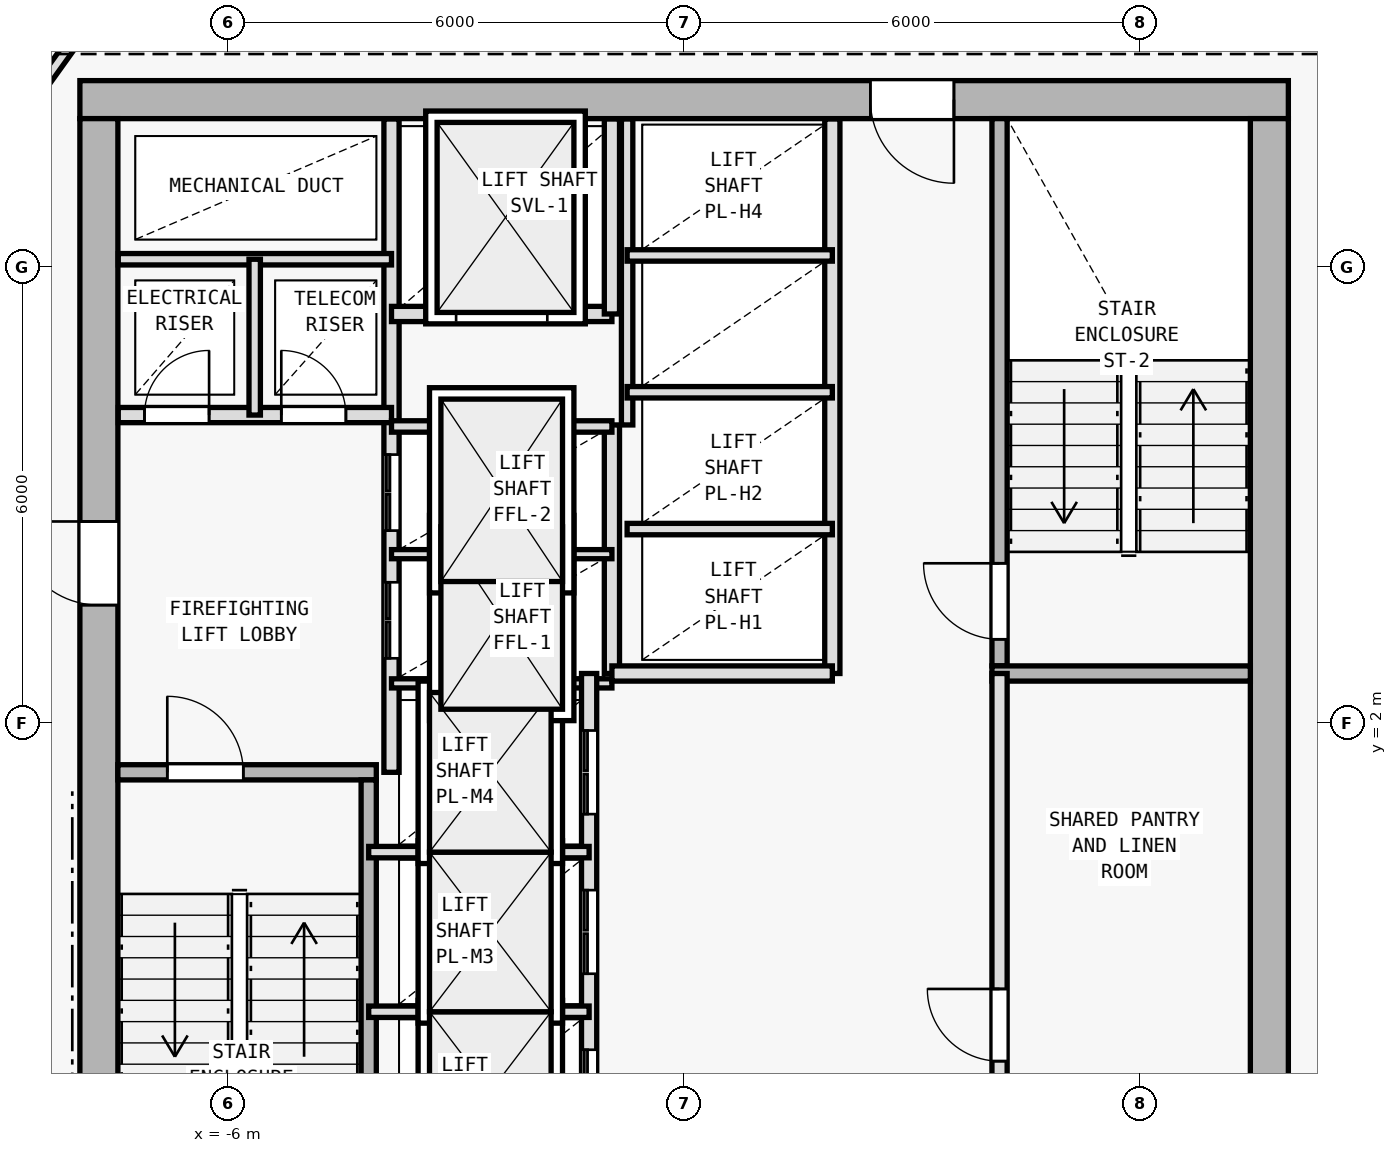
"""IFC4 building model, lengths in metres.
Left out: names, types, materials, properties, quantities, classifications, styles, units other than length and angle.
Written with IfcOpenShell. Run it as: python <this file> out.ifc"""

import sys

from ifc_helpers import new_model, si_unit, direction, frame, frame_2d, origin, origin_2d, place, context, subcontext, project, spatial, rectangle, i_section, extrude, element, fill, save


model = new_model("IFC4")
c1 = context("Model", 3, precision=1e-05, world=origin(), true_north=direction((0.0, 1.0)))
c2 = subcontext(c1, "Body", "Model", "MODEL_VIEW")
j1 = project(units=[si_unit("LENGTHUNIT", "METRE"), si_unit("PLANEANGLEUNIT", "RADIAN")], contexts=[c1])
p1 = place(None, origin())
s1 = spatial("IfcSite", under=j1, at=p1, CompositionType="ELEMENT")
p2 = place(p1, origin())
s2 = spatial("IfcBuilding", under=s1, at=p2, CompositionType="ELEMENT")
p3 = place(p2, frame((0.0, 0.0, 181.8)))
s3 = spatial("IfcBuildingStorey", under=s2, at=p3, CompositionType="ELEMENT", Elevation=181.8)
for number, where, z_axis, x_axis in (
    (1, (7.7, 10.2, 0.0), (0.0, 0.0, 1.0), (1.0, 0.0, 0.0)),
    (2, (-7.7, 10.2, 0.0), (0.0, 0.0, 1.0), (1.0, 0.0, 0.0)),
    (3, (7.7, 0.4, 0.0), (0.0, 0.0, 1.0), (1.0, 0.0, 0.0)),
    (4, (-7.7, 2.0, 0.0), (0.0, 0.0, 1.0), (1.0, 0.0, 0.0)),
):
    element("IfcColumn", number, at=place(p3, frame(where, z_axis=z_axis, x_axis=x_axis)), inside=s3, PredefinedType="COLUMN", context=c2, shape_type="SweptSolid", body=[
        extrude(i_section(OverallWidth=0.404, OverallDepth=0.407, WebThickness=0.017, FlangeThickness=0.028, FilletRadius=0.015, at=origin_2d()), origin(), (0.0, 0.0, 1.0), 3.6),
    ])
p4 = place(p3, frame((7.95, 10.2, 0.0), z_axis=(0.0, 0.0, 1.0), x_axis=(-1.0, 0.0, 0.0)))
e5 = element("IfcWall", 5, at=p4, inside=s3, PredefinedType="SHEAR", context=c2, shape_type="SweptSolid", body=[
    extrude(rectangle(XDim=15.9, YDim=0.5, at=frame_2d((7.95, 0.0))), origin(), (0.0, 0.0, 1.0), 3.28),
])
p5 = place(p4, frame((4.4, 0.0, 0.0)))
e6 = element("IfcOpeningElement", 6, at=p5, cuts=e5, PredefinedType="OPENING", context=c2, shape_type="SweptSolid", body=[
    extrude(rectangle(XDim=1.1, YDim=2.15, at=frame_2d((0.55, 1.075))), frame((0.0, 0.26, 0.0), z_axis=(0.0, -1.0, 0.0), x_axis=(1.0, 0.0, 0.0)), (0.0, 0.0, 1.0), 0.52),
])
p6 = place(p3, frame((-7.7, -9.15, 0.0), z_axis=(0.0, 0.0, 1.0), x_axis=(0.0, 1.0, 0.0)))
e7 = element("IfcWall", 7, at=p6, inside=s3, PredefinedType="SHEAR", context=c2, shape_type="SweptSolid", body=[
    extrude(rectangle(XDim=19.1, YDim=0.5, at=frame_2d((9.55, 0.0))), origin(), (0.0, 0.0, 1.0), 3.28),
])
p7 = place(p6, frame((12.7, 0.0, 0.0)))
e8 = element("IfcOpeningElement", 8, at=p7, cuts=e7, PredefinedType="OPENING", context=c2, shape_type="SweptSolid", body=[
    extrude(rectangle(XDim=1.1, YDim=2.15, at=frame_2d((0.55, 1.075))), frame((0.0, 0.26, 0.0), z_axis=(0.0, -1.0, 0.0), x_axis=(1.0, 0.0, 0.0)), (0.0, 0.0, 1.0), 0.52),
])
p8 = place(p3, frame((7.7, 9.95, 0.0), z_axis=(0.0, 0.0, 1.0), x_axis=(0.0, -1.0, 0.0)))
e9 = element("IfcWall", 9, at=p8, inside=s3, PredefinedType="SHEAR", context=c2, shape_type="SweptSolid", body=[
    extrude(rectangle(XDim=19.1, YDim=0.5, at=frame_2d((9.55, 0.0))), origin(), (0.0, 0.0, 1.0), 3.28),
])
p9 = place(p3, frame((-7.45, 1.35, 0.0), z_axis=(0.0, 0.0, 1.0), x_axis=(1.0, 0.0, 0.0)))
e10 = element("IfcWall", 10, at=p9, inside=s3, PredefinedType="SOLIDWALL", context=c2, shape_type="SweptSolid", body=[
    extrude(rectangle(XDim=3.4, YDim=0.2, at=frame_2d((1.7, 0.0))), origin(), (0.0, 0.0, 1.0), 3.28),
])
p10 = place(p9, frame((0.65, 0.0, 0.0)))
e11 = element("IfcOpeningElement", 11, at=p10, cuts=e10, PredefinedType="OPENING", context=c2, shape_type="SweptSolid", body=[
    extrude(rectangle(XDim=1.0, YDim=2.15, at=frame_2d((0.5, 1.075))), frame((0.0, 0.11, 0.0), z_axis=(0.0, -1.0, 0.0), x_axis=(1.0, 0.0, 0.0)), (0.0, 0.0, 1.0), 0.22),
])
p11 = place(p3, frame((-4.15, -5.95, 0.0), z_axis=(0.0, 0.0, 1.0), x_axis=(0.0, 1.0, 0.0)))
e12 = element("IfcWall", 12, at=p11, inside=s3, PredefinedType="SOLIDWALL", context=c2, shape_type="SweptSolid", body=[
    extrude(rectangle(XDim=7.2, YDim=0.2, at=frame_2d((3.6, 0.0))), origin(), (0.0, 0.0, 1.0), 3.28),
])
p12 = place(p3, frame((-3.85, 1.35, 0.0), z_axis=(0.0, 0.0, 1.0), x_axis=(0.0, 1.0, 0.0)))
e13 = element("IfcWall", 13, at=p12, inside=s3, PredefinedType="SOLIDWALL", context=c2, shape_type="SweptSolid", body=[
    extrude(rectangle(XDim=8.595, YDim=0.2, at=frame_2d((4.297, 0.0))), origin(), (0.0, 0.0, 1.0), 3.28),
])
p13 = place(p12, frame((1.5, 0.0, 0.0)))
e14 = element("IfcOpeningElement", 14, at=p13, cuts=e13, PredefinedType="OPENING", context=c2, shape_type="SweptSolid", body=[
    extrude(rectangle(XDim=1.0, YDim=2.15, at=frame_2d((0.5, 1.075))), frame((0.0, 0.11, 0.0), z_axis=(0.0, -1.0, 0.0), x_axis=(1.0, 0.0, 0.0)), (0.0, 0.0, 1.0), 0.22),
])
p14 = place(p12, frame((3.18, 0.0, 0.0)))
e15 = element("IfcOpeningElement", 15, at=p14, cuts=e13, PredefinedType="OPENING", context=c2, shape_type="SweptSolid", body=[
    extrude(rectangle(XDim=1.0, YDim=2.15, at=frame_2d((0.5, 1.075))), frame((0.0, 0.11, 0.0), z_axis=(0.0, -1.0, 0.0), x_axis=(1.0, 0.0, 0.0)), (0.0, 0.0, 1.0), 0.22),
])
p15 = place(p3, frame((-7.445, 6.05, 0.0), z_axis=(0.0, 0.0, 1.0), x_axis=(1.0, 0.0, 0.0)))
e16 = element("IfcWall", 16, at=p15, inside=s3, PredefinedType="SOLIDWALL", context=c2, shape_type="SweptSolid", body=[
    extrude(rectangle(XDim=3.595, YDim=0.2, at=frame_2d((1.797, 0.0))), origin(), (0.0, 0.0, 1.0), 3.28),
])
p16 = place(p15, frame((0.345, 0.0, 0.0)))
e17 = element("IfcOpeningElement", 17, at=p16, cuts=e16, PredefinedType="OPENING", context=c2, shape_type="SweptSolid", body=[
    extrude(rectangle(XDim=0.85, YDim=2.1, at=frame_2d((0.425, 1.05))), frame((0.0, 0.11, 0.0), z_axis=(0.0, -1.0, 0.0), x_axis=(1.0, 0.0, 0.0)), (0.0, 0.0, 1.0), 0.22),
])
p17 = place(p15, frame((2.145, 0.0, 0.0)))
e18 = element("IfcOpeningElement", 18, at=p17, cuts=e16, PredefinedType="OPENING", context=c2, shape_type="SweptSolid", body=[
    extrude(rectangle(XDim=0.85, YDim=2.1, at=frame_2d((0.425, 1.05))), frame((0.0, 0.11, 0.0), z_axis=(0.0, -1.0, 0.0), x_axis=(1.0, 0.0, 0.0)), (0.0, 0.0, 1.0), 0.22),
])
p18 = place(p3, frame((-7.445, 8.1, 0.0), z_axis=(0.0, 0.0, 1.0), x_axis=(1.0, 0.0, 0.0)))
e19 = element("IfcWall", 19, at=p18, inside=s3, PredefinedType="PARTITIONING", context=c2, shape_type="SweptSolid", body=[
    extrude(rectangle(XDim=3.595, YDim=0.15, at=frame_2d((1.797, 0.0))), origin(), (0.0, 0.0, 1.0), 3.28),
])
p19 = place(p3, frame((-5.65, 6.05, 0.0), z_axis=(0.0, 0.0, 1.0), x_axis=(0.0, 1.0, 0.0)))
e20 = element("IfcWall", 20, at=p19, inside=s3, PredefinedType="PARTITIONING", context=c2, shape_type="SweptSolid", body=[
    extrude(rectangle(XDim=2.05, YDim=0.15, at=frame_2d((1.025, 0.0))), origin(), (0.0, 0.0, 1.0), 3.28),
])
p20 = place(p3, frame((4.15, 2.75, 0.0), z_axis=(0.0, 0.0, 1.0), x_axis=(0.0, 1.0, 0.0)))
e21 = element("IfcWall", 21, at=p20, inside=s3, PredefinedType="SOLIDWALL", context=c2, shape_type="SweptSolid", body=[
    extrude(rectangle(XDim=7.2, YDim=0.2, at=frame_2d((3.6, 0.0))), origin(), (0.0, 0.0, 1.0), 3.28),
])
p21 = place(p20, frame((0.35, 0.0, 0.0)))
e22 = element("IfcOpeningElement", 22, at=p21, cuts=e21, PredefinedType="OPENING", context=c2, shape_type="SweptSolid", body=[
    extrude(rectangle(XDim=1.0, YDim=2.15, at=frame_2d((0.5, 1.075))), frame((0.0, 0.11, 0.0), z_axis=(0.0, -1.0, 0.0), x_axis=(1.0, 0.0, 0.0)), (0.0, 0.0, 1.0), 0.22),
])
p22 = place(p3, frame((4.05, 2.65, 0.0), z_axis=(0.0, 0.0, 1.0), x_axis=(1.0, 0.0, 0.0)))
e23 = element("IfcWall", 23, at=p22, inside=s3, PredefinedType="SOLIDWALL", context=c2, shape_type="SweptSolid", body=[
    extrude(rectangle(XDim=3.4, YDim=0.2, at=frame_2d((1.7, 0.0))), origin(), (0.0, 0.0, 1.0), 3.28),
])
p23 = place(p3, frame((-0.95, 2.65, 0.0), z_axis=(0.0, 0.0, 1.0), x_axis=(0.0, 1.0, 0.0)))
e24 = element("IfcWall", 24, at=p23, inside=s3, PredefinedType="SOLIDWALL", context=c2, shape_type="SweptSolid", body=[
    extrude(rectangle(XDim=3.27, YDim=0.2, at=frame_2d((1.635, 0.0))), origin(), (0.0, 0.0, 1.0), 3.28),
])
for number, where, z_axis, x_axis in (
    (25, (-3.85, 2.52, 0.0), (0.0, 0.0, 1.0), (1.0, 0.0, 0.0)),
    (26, (-3.85, 4.22, 0.0), (0.0, 0.0, 1.0), (1.0, 0.0, 0.0)),
):
    element("IfcWall", number, at=place(p3, frame(where, z_axis=z_axis, x_axis=x_axis)), inside=s3, PredefinedType="PARTITIONING", context=c2, shape_type="SweptSolid", body=[
        extrude(rectangle(XDim=2.9, YDim=0.12, at=frame_2d((1.45, 0.0))), origin(), (0.0, 0.0, 1.0), 3.28),
    ])
p24 = place(p3, frame((-3.85, 5.9, 0.0), z_axis=(0.0, 0.0, 1.0), x_axis=(1.0, 0.0, 0.0)))
e27 = element("IfcWall", 27, at=p24, inside=s3, PredefinedType="PARTITIONING", context=c2, shape_type="SweptSolid", body=[
    extrude(rectangle(XDim=2.9, YDim=0.15, at=frame_2d((1.45, 0.0))), origin(), (0.0, 0.0, 1.0), 3.28),
])
p25 = place(p3, frame((-3.85, 7.38, 0.0), z_axis=(0.0, 0.0, 1.0), x_axis=(1.0, 0.0, 0.0)))
e28 = element("IfcWall", 28, at=p25, inside=s3, PredefinedType="SOLIDWALL", context=c2, shape_type="SweptSolid", body=[
    extrude(rectangle(XDim=2.9, YDim=0.2, at=frame_2d((1.45, 0.0))), origin(), (0.0, 0.0, 1.0), 3.28),
])
p26 = place(p25, frame((0.85, 0.0, 0.0)))
e29 = element("IfcOpeningElement", 29, at=p26, cuts=e28, PredefinedType="OPENING", context=c2, shape_type="SweptSolid", body=[
    extrude(rectangle(XDim=1.2, YDim=2.2, at=frame_2d((0.6, 1.1))), frame((0.0, 0.11, 0.0), z_axis=(0.0, -1.0, 0.0), x_axis=(1.0, 0.0, 0.0)), (0.0, 0.0, 1.0), 0.22),
])
p27 = place(p3, frame((-0.95, 7.38, 0.0), z_axis=(0.0, 0.0, 1.0), x_axis=(0.0, 1.0, 0.0)))
e30 = element("IfcWall", 30, at=p27, inside=s3, PredefinedType="SOLIDWALL", context=c2, shape_type="SweptSolid", body=[
    extrude(rectangle(XDim=2.565, YDim=0.2, at=frame_2d((1.283, 0.0))), origin(), (0.0, 0.0, 1.0), 3.28),
])
p28 = place(p3, frame((4.15, -6.05, 0.0), z_axis=(0.0, 0.0, 1.0), x_axis=(0.0, 1.0, 0.0)))
e31 = element("IfcWall", 31, at=p28, inside=s3, PredefinedType="SOLIDWALL", context=c2, shape_type="SweptSolid", body=[
    extrude(rectangle(XDim=8.7, YDim=0.2, at=frame_2d((4.35, 0.0))), origin(), (0.0, 0.0, 1.0), 3.28),
])
p29 = place(p28, frame((3.6, 0.0, 0.0)))
e32 = element("IfcOpeningElement", 32, at=p29, cuts=e31, PredefinedType="OPENING", context=c2, shape_type="SweptSolid", body=[
    extrude(rectangle(XDim=0.95, YDim=2.1, at=frame_2d((0.475, 1.05))), frame((0.0, 0.11, 0.0), z_axis=(0.0, -1.0, 0.0), x_axis=(1.0, 0.0, 0.0)), (0.0, 0.0, 1.0), 0.22),
])
p30 = place(p3, frame((-1.25, -6.05, 0.0), z_axis=(0.0, 0.0, 1.0), x_axis=(0.0, 1.0, 0.0)))
e33 = element("IfcWall", 33, at=p30, inside=s3, PredefinedType="SOLIDWALL", context=c2, shape_type="SweptSolid", body=[
    extrude(rectangle(XDim=8.7, YDim=0.2, at=frame_2d((4.35, 0.0))), origin(), (0.0, 0.0, 1.0), 3.28),
])
p31 = place(p30, frame((0.55, 0.0, 0.0)))
e34 = element("IfcOpeningElement", 34, at=p31, cuts=e33, PredefinedType="OPENING", context=c2, shape_type="SweptSolid", body=[
    extrude(rectangle(XDim=1.1, YDim=2.15, at=frame_2d((0.55, 1.075))), frame((0.0, 0.11, 0.0), z_axis=(0.0, -1.0, 0.0), x_axis=(1.0, 0.0, 0.0)), (0.0, 0.0, 1.0), 0.22),
])
p32 = place(p30, frame((2.65, 0.0, 0.0)))
e35 = element("IfcOpeningElement", 35, at=p32, cuts=e33, PredefinedType="OPENING", context=c2, shape_type="SweptSolid", body=[
    extrude(rectangle(XDim=1.1, YDim=2.15, at=frame_2d((0.55, 1.075))), frame((0.0, 0.11, 0.0), z_axis=(0.0, -1.0, 0.0), x_axis=(1.0, 0.0, 0.0)), (0.0, 0.0, 1.0), 0.22),
])
p33 = place(p30, frame((4.75, 0.0, 0.0)))
e36 = element("IfcOpeningElement", 36, at=p33, cuts=e33, PredefinedType="OPENING", context=c2, shape_type="SweptSolid", body=[
    extrude(rectangle(XDim=1.1, YDim=2.15, at=frame_2d((0.55, 1.075))), frame((0.0, 0.11, 0.0), z_axis=(0.0, -1.0, 0.0), x_axis=(1.0, 0.0, 0.0)), (0.0, 0.0, 1.0), 0.22),
])
p34 = place(p30, frame((6.85, 0.0, 0.0)))
e37 = element("IfcOpeningElement", 37, at=p34, cuts=e33, PredefinedType="OPENING", context=c2, shape_type="SweptSolid", body=[
    extrude(rectangle(XDim=1.1, YDim=2.15, at=frame_2d((0.55, 1.075))), frame((0.0, 0.11, 0.0), z_axis=(0.0, -1.0, 0.0), x_axis=(1.0, 0.0, 0.0)), (0.0, 0.0, 1.0), 0.22),
])
for number, where, z_axis, x_axis in (
    (38, (-4.15, -1.8, 0.0), (0.0, 0.0, 1.0), (1.0, 0.0, 0.0)),
    (39, (-4.15, 0.3, 0.0), (0.0, 0.0, 1.0), (1.0, 0.0, 0.0)),
):
    element("IfcWall", number, at=place(p3, frame(where, z_axis=z_axis, x_axis=x_axis)), inside=s3, PredefinedType="PARTITIONING", context=c2, shape_type="SweptSolid", body=[
        extrude(rectangle(XDim=2.9, YDim=0.15, at=frame_2d((1.45, 0.0))), origin(), (0.0, 0.0, 1.0), 3.28),
    ])
p35 = place(p3, frame((1.95, 2.65, 0.0), z_axis=(0.0, 0.0, 1.0), x_axis=(0.0, 1.0, 0.0)))
e40 = element("IfcWall", 40, at=p35, inside=s3, PredefinedType="SOLIDWALL", context=c2, shape_type="SweptSolid", body=[
    extrude(rectangle(XDim=7.295, YDim=0.2, at=frame_2d((3.647, 0.0))), origin(), (0.0, 0.0, 1.0), 3.28),
])
p36 = place(p3, frame((-0.95, 2.65, 0.0), z_axis=(0.0, 0.0, 1.0), x_axis=(1.0, 0.0, 0.0)))
e41 = element("IfcWall", 41, at=p36, inside=s3, PredefinedType="SOLIDWALL", context=c2, shape_type="SweptSolid", body=[
    extrude(rectangle(XDim=2.9, YDim=0.2, at=frame_2d((1.45, 0.0))), origin(), (0.0, 0.0, 1.0), 3.28),
])
p37 = place(p3, frame((-0.75, 5.92, 0.0), z_axis=(0.0, 0.0, 1.0), x_axis=(0.0, 1.0, 0.0)))
e42 = element("IfcWall", 42, at=p37, inside=s3, PredefinedType="PARTITIONING", context=c2, shape_type="SweptSolid", body=[
    extrude(rectangle(XDim=4.025, YDim=0.15, at=frame_2d((2.013, 0.0))), origin(), (0.0, 0.0, 1.0), 3.28),
])
for number, where, z_axis, x_axis in (
    (43, (-0.75, 4.55, 0.0), (0.0, 0.0, 1.0), (1.0, 0.0, 0.0)),
    (44, (-0.75, 6.35, 0.0), (0.0, 0.0, 1.0), (1.0, 0.0, 0.0)),
    (45, (-0.75, 8.15, 0.0), (0.0, 0.0, 1.0), (1.0, 0.0, 0.0)),
):
    element("IfcWall", number, at=place(p3, frame(where, z_axis=z_axis, x_axis=x_axis)), inside=s3, PredefinedType="PARTITIONING", context=c2, shape_type="SweptSolid", body=[
        extrude(rectangle(XDim=2.7, YDim=0.15, at=frame_2d((1.35, 0.0))), origin(), (0.0, 0.0, 1.0), 3.28),
    ])
p38 = place(p3, frame((-9.86, 8.426, 0.0), z_axis=(0.0, 0.0, 1.0), x_axis=(0.582449511476, 0.812866881218, 0.0)))
e46 = element("IfcWall", 46, at=p38, inside=s3, PredefinedType="PARTITIONING", context=c2, shape_type="SweptSolid", body=[
    extrude(rectangle(XDim=4.84, YDim=0.15, at=frame_2d((2.42, 0.0))), origin(), (0.0, 0.0, 1.0), 2.935),
])
p39 = place(p3, frame((7.023, 12.36, 0.0), z_axis=(0.0, 0.0, 1.0), x_axis=(0.84376480085, -0.536713108511, 0.0)))
e47 = element("IfcWall", 47, at=p39, inside=s3, PredefinedType="PARTITIONING", context=c2, shape_type="SweptSolid", body=[
    extrude(rectangle(XDim=7.297, YDim=0.15, at=frame_2d((3.648, 0.0))), origin(), (0.0, 0.0, 1.0), 2.705),
])
p40 = place(p39, frame((2.419, 0.0, 0.0)))
e48 = element("IfcOpeningElement", 48, at=p40, cuts=e47, PredefinedType="OPENING", context=c2, shape_type="SweptSolid", body=[
    extrude(rectangle(XDim=0.9, YDim=2.1, at=frame_2d((0.45, 1.05))), frame((0.0, 0.085, 0.0), z_axis=(0.0, -1.0, 0.0), x_axis=(1.0, 0.0, 0.0)), (0.0, 0.0, 1.0), 0.17),
])
p41 = place(p7, origin())
e49 = element("IfcDoor", 49, at=p41, inside=s3, OperationType="SINGLE_SWING_RIGHT", PredefinedType="DOOR", context=c2, shape_type="SweptSolid", body=[
    extrude(rectangle(XDim=1.1, YDim=2.15, at=frame_2d((0.55, 1.075))), frame((0.0, 0.025, 0.0), z_axis=(0.0, -1.0, 0.0), x_axis=(1.0, 0.0, 0.0)), (0.0, 0.0, 1.0), 0.05),
])
fill(e8, e49)
p42 = place(p5, origin())
e50 = element("IfcDoor", 50, at=p42, inside=s3, OperationType="SINGLE_SWING_LEFT", PredefinedType="DOOR", context=c2, shape_type="SweptSolid", body=[
    extrude(rectangle(XDim=1.1, YDim=2.15, at=frame_2d((0.55, 1.075))), frame((0.0, 0.025, 0.0), z_axis=(0.0, -1.0, 0.0), x_axis=(1.0, 0.0, 0.0)), (0.0, 0.0, 1.0), 0.05),
])
fill(e6, e50)
p43 = place(p10, origin())
e51 = element("IfcDoor", 51, at=p43, inside=s3, OperationType="SINGLE_SWING_LEFT", PredefinedType="DOOR", context=c2, shape_type="SweptSolid", body=[
    extrude(rectangle(XDim=1.0, YDim=2.15, at=frame_2d((0.5, 1.075))), frame((0.0, 0.025, 0.0), z_axis=(0.0, -1.0, 0.0), x_axis=(1.0, 0.0, 0.0)), (0.0, 0.0, 1.0), 0.05),
])
fill(e11, e51)
p44 = place(p16, origin())
e52 = element("IfcDoor", 52, at=p44, inside=s3, OperationType="SINGLE_SWING_RIGHT", PredefinedType="DOOR", context=c2, shape_type="SweptSolid", body=[
    extrude(rectangle(XDim=0.85, YDim=2.1, at=frame_2d((0.425, 1.05))), frame((0.0, 0.025, 0.0), z_axis=(0.0, -1.0, 0.0), x_axis=(1.0, 0.0, 0.0)), (0.0, 0.0, 1.0), 0.05),
])
fill(e17, e52)
p45 = place(p17, origin())
e53 = element("IfcDoor", 53, at=p45, inside=s3, OperationType="SINGLE_SWING_LEFT", PredefinedType="DOOR", context=c2, shape_type="SweptSolid", body=[
    extrude(rectangle(XDim=0.85, YDim=2.1, at=frame_2d((0.425, 1.05))), frame((0.0, 0.025, 0.0), z_axis=(0.0, -1.0, 0.0), x_axis=(1.0, 0.0, 0.0)), (0.0, 0.0, 1.0), 0.05),
])
fill(e18, e53)
p46 = place(p21, origin())
e54 = element("IfcDoor", 54, at=p46, inside=s3, OperationType="SINGLE_SWING_RIGHT", PredefinedType="DOOR", context=c2, shape_type="SweptSolid", body=[
    extrude(rectangle(XDim=1.0, YDim=2.15, at=frame_2d((0.5, 1.075))), frame((0.0, 0.025, 0.0), z_axis=(0.0, -1.0, 0.0), x_axis=(1.0, 0.0, 0.0)), (0.0, 0.0, 1.0), 0.05),
])
fill(e22, e54)
p47 = place(p26, origin())
e55 = element("IfcDoor", 55, at=p47, inside=s3, OperationType="DOUBLE_DOOR_SLIDING", PredefinedType="DOOR", context=c2, shape_type="SweptSolid", body=[
    extrude(rectangle(XDim=1.2, YDim=2.2, at=frame_2d((0.6, 1.1))), frame((0.0, 0.025, 0.0), z_axis=(0.0, -1.0, 0.0), x_axis=(1.0, 0.0, 0.0)), (0.0, 0.0, 1.0), 0.05),
])
fill(e29, e55)
p48 = place(p29, origin())
e56 = element("IfcDoor", 56, at=p48, inside=s3, OperationType="SINGLE_SWING_RIGHT", PredefinedType="DOOR", context=c2, shape_type="SweptSolid", body=[
    extrude(rectangle(XDim=0.95, YDim=2.1, at=frame_2d((0.475, 1.05))), frame((0.0, 0.025, 0.0), z_axis=(0.0, -1.0, 0.0), x_axis=(1.0, 0.0, 0.0)), (0.0, 0.0, 1.0), 0.05),
])
fill(e32, e56)
p49 = place(p32, origin())
e57 = element("IfcDoor", 57, at=p49, inside=s3, OperationType="DOUBLE_DOOR_SLIDING", PredefinedType="DOOR", context=c2, shape_type="SweptSolid", body=[
    extrude(rectangle(XDim=1.1, YDim=2.15, at=frame_2d((0.55, 1.075))), frame((0.0, 0.025, 0.0), z_axis=(0.0, -1.0, 0.0), x_axis=(1.0, 0.0, 0.0)), (0.0, 0.0, 1.0), 0.05),
])
fill(e35, e57)
p50 = place(p33, origin())
e58 = element("IfcDoor", 58, at=p50, inside=s3, OperationType="DOUBLE_DOOR_SLIDING", PredefinedType="DOOR", context=c2, shape_type="SweptSolid", body=[
    extrude(rectangle(XDim=1.1, YDim=2.15, at=frame_2d((0.55, 1.075))), frame((0.0, 0.025, 0.0), z_axis=(0.0, -1.0, 0.0), x_axis=(1.0, 0.0, 0.0)), (0.0, 0.0, 1.0), 0.05),
])
fill(e36, e58)
p51 = place(p34, origin())
e59 = element("IfcDoor", 59, at=p51, inside=s3, OperationType="DOUBLE_DOOR_SLIDING", PredefinedType="DOOR", context=c2, shape_type="SweptSolid", body=[
    extrude(rectangle(XDim=1.1, YDim=2.15, at=frame_2d((0.55, 1.075))), frame((0.0, 0.025, 0.0), z_axis=(0.0, -1.0, 0.0), x_axis=(1.0, 0.0, 0.0)), (0.0, 0.0, 1.0), 0.05),
])
fill(e37, e59)
p52 = place(p13, origin())
e60 = element("IfcDoor", 60, at=p52, inside=s3, OperationType="DOUBLE_DOOR_SLIDING", PredefinedType="DOOR", context=c2, shape_type="SweptSolid", body=[
    extrude(rectangle(XDim=1.0, YDim=2.15, at=frame_2d((0.5, 1.075))), frame((0.0, 0.025, 0.0), z_axis=(0.0, -1.0, 0.0), x_axis=(1.0, 0.0, 0.0)), (0.0, 0.0, 1.0), 0.05),
])
fill(e14, e60)
p53 = place(p14, origin())
e61 = element("IfcDoor", 61, at=p53, inside=s3, OperationType="DOUBLE_DOOR_SLIDING", PredefinedType="DOOR", context=c2, shape_type="SweptSolid", body=[
    extrude(rectangle(XDim=1.0, YDim=2.15, at=frame_2d((0.5, 1.075))), frame((0.0, 0.025, 0.0), z_axis=(0.0, -1.0, 0.0), x_axis=(1.0, 0.0, 0.0)), (0.0, 0.0, 1.0), 0.05),
])
fill(e15, e61)
save(model, sys.argv[1])
